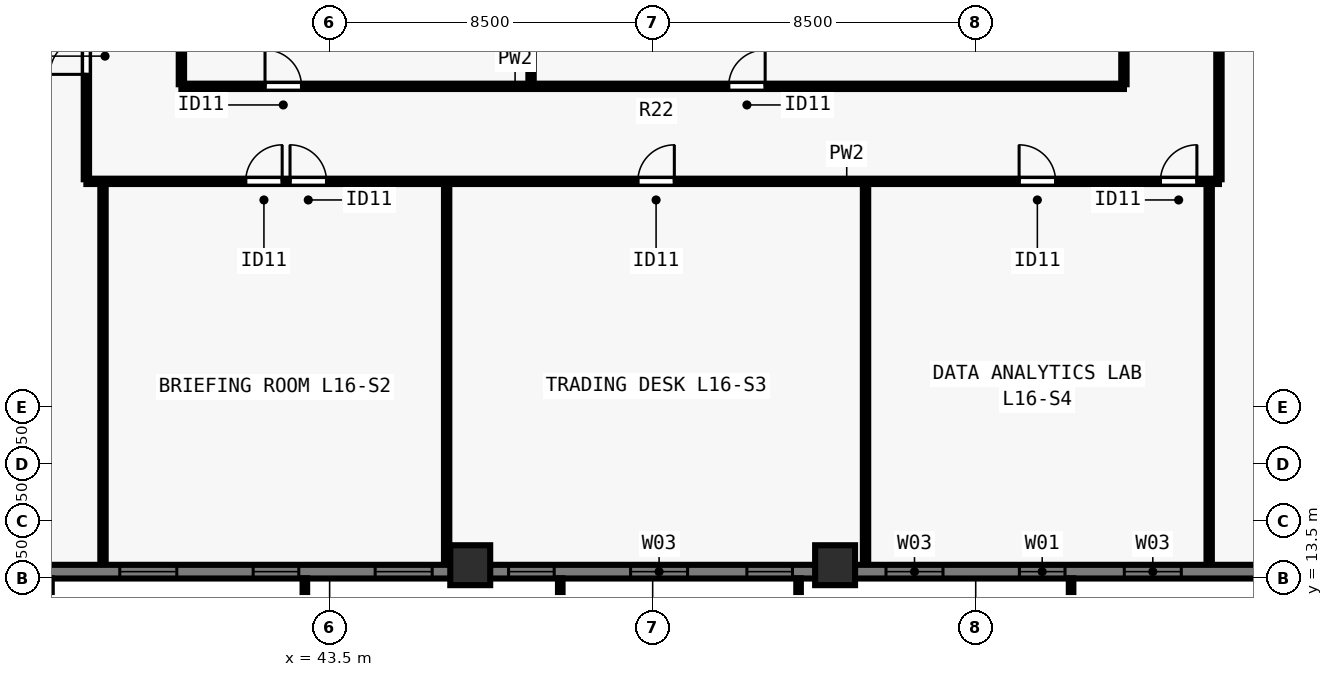
"""IFC4 building model, lengths in metres.
Left out: names, types, materials, properties, quantities, classifications, styles, units other than length and angle.
Written with IfcOpenShell. Run it as: python <this file> out.ifc"""

import sys

from ifc_helpers import new_model, si_unit, direction, frame, frame_2d, origin, origin_2d, place, context, subcontext, project, spatial, rectangle, extrude, element, fill, save


model = new_model("IFC4")
c1 = context("Model", 3, precision=1e-05, world=origin(), true_north=direction((0.0, 1.0)))
c2 = subcontext(c1, "Body", "Model", "MODEL_VIEW")
j1 = project(units=[si_unit("LENGTHUNIT", "METRE"), si_unit("PLANEANGLEUNIT", "RADIAN")], contexts=[c1])
p1 = place(None, origin())
s1 = spatial("IfcSite", under=j1, at=p1, CompositionType="ELEMENT")
p2 = place(p1, origin())
s2 = spatial("IfcBuilding", under=s1, at=p2, CompositionType="ELEMENT")
p3 = place(p2, frame((0.0, 0.0, 62.0)))
s3 = spatial("IfcBuildingStorey", under=s2, at=p3, CompositionType="ELEMENT", Elevation=62.0)
for number, where, z_axis, x_axis in (
    (1, (47.2, 13.85, 0.0), (0.0, 0.0, 1.0), (1.0, 0.0, 0.0)),
    (2, (56.8, 13.85, 0.0), (0.0, 0.0, 1.0), (1.0, 0.0, 0.0)),
):
    element("IfcColumn", number, at=place(p3, frame(where, z_axis=z_axis, x_axis=x_axis)), inside=s3, PredefinedType="COLUMN", context=c2, shape_type="SweptSolid", body=[
        extrude(rectangle(XDim=1.05, YDim=1.05, at=origin_2d()), origin(), (0.0, 0.0, 1.0), 3.5),
    ])
p4 = place(p3, frame((74.5, 13.68, 0.0), z_axis=(0.0, 0.0, 1.0), x_axis=(-1.0, 0.0, 0.0)))
e3 = element("IfcWall", 3, at=p4, inside=s3, PredefinedType="SOLIDWALL", context=c2, shape_type="SweptSolid", body=[
    extrude(rectangle(XDim=44.662, YDim=0.36, at=frame_2d((22.331, 0.0))), origin(), (0.0, 0.0, 1.0), 3.28),
])
p5 = place(p4, frame((4.93, 0.0, 0.8)))
e4 = element("IfcOpeningElement", 4, at=p5, cuts=e3, PredefinedType="OPENING", context=c2, shape_type="SweptSolid", body=[
    extrude(rectangle(XDim=1.2, YDim=1.544, at=frame_2d((0.6, 0.772))), frame((0.0, 0.19, 0.0), z_axis=(0.0, -1.0, 0.0), x_axis=(1.0, 0.0, 0.0)), (0.0, 0.0, 1.0), 0.38),
])
p6 = place(p4, frame((8.59, 0.0, 0.8)))
e5 = element("IfcOpeningElement", 5, at=p6, cuts=e3, PredefinedType="OPENING", context=c2, shape_type="SweptSolid", body=[
    extrude(rectangle(XDim=1.5, YDim=1.544, at=frame_2d((0.75, 0.772))), frame((0.0, 0.19, 0.0), z_axis=(0.0, -1.0, 0.0), x_axis=(1.0, 0.0, 0.0)), (0.0, 0.0, 1.0), 0.38),
])
p7 = place(p4, frame((11.65, 0.0, 0.8)))
e6 = element("IfcOpeningElement", 6, at=p7, cuts=e3, PredefinedType="OPENING", context=c2, shape_type="SweptSolid", body=[
    extrude(rectangle(XDim=1.2, YDim=1.544, at=frame_2d((0.6, 0.772))), frame((0.0, 0.19, 0.0), z_axis=(0.0, -1.0, 0.0), x_axis=(1.0, 0.0, 0.0)), (0.0, 0.0, 1.0), 0.38),
])
p8 = place(p4, frame((14.861, 0.0, 0.8)))
e7 = element("IfcOpeningElement", 7, at=p8, cuts=e3, PredefinedType="OPENING", context=c2, shape_type="SweptSolid", body=[
    extrude(rectangle(XDim=1.5, YDim=1.544, at=frame_2d((0.75, 0.772))), frame((0.0, 0.19, 0.0), z_axis=(0.0, -1.0, 0.0), x_axis=(1.0, 0.0, 0.0)), (0.0, 0.0, 1.0), 0.38),
])
p9 = place(p4, frame((18.821, 0.0, 0.8)))
e8 = element("IfcOpeningElement", 8, at=p9, cuts=e3, PredefinedType="OPENING", context=c2, shape_type="SweptSolid", body=[
    extrude(rectangle(XDim=1.2, YDim=1.544, at=frame_2d((0.6, 0.772))), frame((0.0, 0.19, 0.0), z_axis=(0.0, -1.0, 0.0), x_axis=(1.0, 0.0, 0.0)), (0.0, 0.0, 1.0), 0.38),
])
p10 = place(p4, frame((21.581, 0.0, 0.8)))
e9 = element("IfcOpeningElement", 9, at=p10, cuts=e3, PredefinedType="OPENING", context=c2, shape_type="SweptSolid", body=[
    extrude(rectangle(XDim=1.5, YDim=1.544, at=frame_2d((0.75, 0.772))), frame((0.0, 0.19, 0.0), z_axis=(0.0, -1.0, 0.0), x_axis=(1.0, 0.0, 0.0)), (0.0, 0.0, 1.0), 0.38),
])
p11 = place(p4, frame((25.091, 0.0, 0.8)))
e10 = element("IfcOpeningElement", 10, at=p11, cuts=e3, PredefinedType="OPENING", context=c2, shape_type="SweptSolid", body=[
    extrude(rectangle(XDim=1.2, YDim=1.544, at=frame_2d((0.6, 0.772))), frame((0.0, 0.19, 0.0), z_axis=(0.0, -1.0, 0.0), x_axis=(1.0, 0.0, 0.0)), (0.0, 0.0, 1.0), 0.38),
])
p12 = place(p4, frame((28.302, 0.0, 0.8)))
e11 = element("IfcOpeningElement", 11, at=p12, cuts=e3, PredefinedType="OPENING", context=c2, shape_type="SweptSolid", body=[
    extrude(rectangle(XDim=1.5, YDim=1.544, at=frame_2d((0.75, 0.772))), frame((0.0, 0.19, 0.0), z_axis=(0.0, -1.0, 0.0), x_axis=(1.0, 0.0, 0.0)), (0.0, 0.0, 1.0), 0.38),
])
p13 = place(p4, frame((31.812, 0.0, 0.8)))
e12 = element("IfcOpeningElement", 12, at=p13, cuts=e3, PredefinedType="OPENING", context=c2, shape_type="SweptSolid", body=[
    extrude(rectangle(XDim=1.2, YDim=1.544, at=frame_2d((0.6, 0.772))), frame((0.0, 0.19, 0.0), z_axis=(0.0, -1.0, 0.0), x_axis=(1.0, 0.0, 0.0)), (0.0, 0.0, 1.0), 0.38),
])
p14 = place(p4, frame((35.022, 0.0, 0.8)))
e13 = element("IfcOpeningElement", 13, at=p14, cuts=e3, PredefinedType="OPENING", context=c2, shape_type="SweptSolid", body=[
    extrude(rectangle(XDim=1.5, YDim=1.544, at=frame_2d((0.75, 0.772))), frame((0.0, 0.19, 0.0), z_axis=(0.0, -1.0, 0.0), x_axis=(1.0, 0.0, 0.0)), (0.0, 0.0, 1.0), 0.38),
])
p15 = place(p4, frame((38.532, 0.0, 0.8)))
e14 = element("IfcOpeningElement", 14, at=p15, cuts=e3, PredefinedType="OPENING", context=c2, shape_type="SweptSolid", body=[
    extrude(rectangle(XDim=1.2, YDim=1.544, at=frame_2d((0.6, 0.772))), frame((0.0, 0.19, 0.0), z_axis=(0.0, -1.0, 0.0), x_axis=(1.0, 0.0, 0.0)), (0.0, 0.0, 1.0), 0.38),
])
p16 = place(p3, frame((37.1, 23.95, 0.0), z_axis=(0.0, 0.0, 1.0), x_axis=(1.0, 0.0, 0.0)))
e15 = element("IfcWall", 15, at=p16, inside=s3, PredefinedType="PARTITIONING", context=c2, shape_type="SweptSolid", body=[
    extrude(rectangle(XDim=29.8, YDim=0.14, at=frame_2d((14.9, 0.0))), origin(), (0.0, 0.0, 1.0), 3.28),
])
p17 = place(p16, frame((4.191, 0.0, 0.0)))
e16 = element("IfcOpeningElement", 16, at=p17, cuts=e15, PredefinedType="OPENING", context=c2, shape_type="SweptSolid", body=[
    extrude(rectangle(XDim=0.96, YDim=2.12, at=frame_2d((0.48, 1.06))), frame((0.0, 0.08, 0.0), z_axis=(0.0, -1.0, 0.0), x_axis=(1.0, 0.0, 0.0)), (0.0, 0.0, 1.0), 0.16),
])
p18 = place(p16, frame((5.358, 0.0, 0.0)))
e17 = element("IfcOpeningElement", 17, at=p18, cuts=e15, PredefinedType="OPENING", context=c2, shape_type="SweptSolid", body=[
    extrude(rectangle(XDim=0.96, YDim=2.12, at=frame_2d((0.48, 1.06))), frame((0.0, 0.08, 0.0), z_axis=(0.0, -1.0, 0.0), x_axis=(1.0, 0.0, 0.0)), (0.0, 0.0, 1.0), 0.16),
])
p19 = place(p16, frame((14.51, 0.0, 0.0)))
e18 = element("IfcOpeningElement", 18, at=p19, cuts=e15, PredefinedType="OPENING", context=c2, shape_type="SweptSolid", body=[
    extrude(rectangle(XDim=0.96, YDim=2.12, at=frame_2d((0.48, 1.06))), frame((0.0, 0.08, 0.0), z_axis=(0.0, -1.0, 0.0), x_axis=(1.0, 0.0, 0.0)), (0.0, 0.0, 1.0), 0.16),
])
p20 = place(p16, frame((24.542, 0.0, 0.0)))
e19 = element("IfcOpeningElement", 19, at=p20, cuts=e15, PredefinedType="OPENING", context=c2, shape_type="SweptSolid", body=[
    extrude(rectangle(XDim=0.96, YDim=2.12, at=frame_2d((0.48, 1.06))), frame((0.0, 0.08, 0.0), z_axis=(0.0, -1.0, 0.0), x_axis=(1.0, 0.0, 0.0)), (0.0, 0.0, 1.0), 0.16),
])
p21 = place(p16, frame((28.26, 0.0, 0.0)))
e20 = element("IfcOpeningElement", 20, at=p21, cuts=e15, PredefinedType="OPENING", context=c2, shape_type="SweptSolid", body=[
    extrude(rectangle(XDim=0.96, YDim=2.12, at=frame_2d((0.48, 1.06))), frame((0.0, 0.08, 0.0), z_axis=(0.0, -1.0, 0.0), x_axis=(1.0, 0.0, 0.0)), (0.0, 0.0, 1.0), 0.16),
])
p22 = place(p3, frame((37.1, 24.005, 0.0), z_axis=(0.0, 0.0, 1.0), x_axis=(0.0, 1.0, 0.0)))
e21 = element("IfcWall", 21, at=p22, inside=s3, PredefinedType="PARTITIONING", context=c2, shape_type="SweptSolid", body=[
    extrude(rectangle(XDim=29.99, YDim=0.14, at=frame_2d((14.995, 0.0))), origin(), (0.0, 0.0, 1.0), 3.28),
])
p23 = place(p22, frame((2.76, 0.0, 0.0)))
e22 = element("IfcOpeningElement", 22, at=p23, cuts=e21, PredefinedType="OPENING", context=c2, shape_type="SweptSolid", body=[
    extrude(rectangle(XDim=0.96, YDim=2.12, at=frame_2d((0.48, 1.06))), frame((0.0, 0.08, 0.0), z_axis=(0.0, -1.0, 0.0), x_axis=(1.0, 0.0, 0.0)), (0.0, 0.0, 1.0), 0.16),
])
p24 = place(p22, frame((8.598, 0.0, 0.0)))
e23 = element("IfcOpeningElement", 23, at=p24, cuts=e21, PredefinedType="OPENING", context=c2, shape_type="SweptSolid", body=[
    extrude(rectangle(XDim=0.96, YDim=2.12, at=frame_2d((0.48, 1.06))), frame((0.0, 0.08, 0.0), z_axis=(0.0, -1.0, 0.0), x_axis=(1.0, 0.0, 0.0)), (0.0, 0.0, 1.0), 0.16),
])
p25 = place(p22, frame((14.578, 0.0, 0.0)))
e24 = element("IfcOpeningElement", 24, at=p25, cuts=e21, PredefinedType="OPENING", context=c2, shape_type="SweptSolid", body=[
    extrude(rectangle(XDim=0.96, YDim=2.12, at=frame_2d((0.48, 1.06))), frame((0.0, 0.08, 0.0), z_axis=(0.0, -1.0, 0.0), x_axis=(1.0, 0.0, 0.0)), (0.0, 0.0, 1.0), 0.16),
])
p26 = place(p22, frame((20.558, 0.0, 0.0)))
e25 = element("IfcOpeningElement", 25, at=p26, cuts=e21, PredefinedType="OPENING", context=c2, shape_type="SweptSolid", body=[
    extrude(rectangle(XDim=0.96, YDim=2.12, at=frame_2d((0.48, 1.06))), frame((0.0, 0.08, 0.0), z_axis=(0.0, -1.0, 0.0), x_axis=(1.0, 0.0, 0.0)), (0.0, 0.0, 1.0), 0.16),
])
p27 = place(p22, frame((26.333, 0.0, 0.0)))
e26 = element("IfcOpeningElement", 26, at=p27, cuts=e21, PredefinedType="OPENING", context=c2, shape_type="SweptSolid", body=[
    extrude(rectangle(XDim=0.96, YDim=2.12, at=frame_2d((0.48, 1.06))), frame((0.0, 0.08, 0.0), z_axis=(0.0, -1.0, 0.0), x_axis=(1.0, 0.0, 0.0)), (0.0, 0.0, 1.0), 0.16),
])
p28 = place(p3, frame((66.9, 24.005, 0.0), z_axis=(0.0, 0.0, 1.0), x_axis=(0.0, 1.0, 0.0)))
e27 = element("IfcWall", 27, at=p28, inside=s3, PredefinedType="PARTITIONING", context=c2, shape_type="SweptSolid", body=[
    extrude(rectangle(XDim=29.99, YDim=0.14, at=frame_2d((14.995, 0.0))), origin(), (0.0, 0.0, 1.0), 3.28),
])
p29 = place(p28, frame((4.344, 0.0, 0.0)))
e28 = element("IfcOpeningElement", 28, at=p29, cuts=e27, PredefinedType="OPENING", context=c2, shape_type="SweptSolid", body=[
    extrude(rectangle(XDim=0.96, YDim=2.12, at=frame_2d((0.48, 1.06))), frame((0.0, 0.08, 0.0), z_axis=(0.0, -1.0, 0.0), x_axis=(1.0, 0.0, 0.0)), (0.0, 0.0, 1.0), 0.16),
])
p30 = place(p28, frame((14.452, 0.0, 0.0)))
e29 = element("IfcOpeningElement", 29, at=p30, cuts=e27, PredefinedType="OPENING", context=c2, shape_type="SweptSolid", body=[
    extrude(rectangle(XDim=0.96, YDim=2.12, at=frame_2d((0.48, 1.06))), frame((0.0, 0.08, 0.0), z_axis=(0.0, -1.0, 0.0), x_axis=(1.0, 0.0, 0.0)), (0.0, 0.0, 1.0), 0.16),
])
p31 = place(p28, frame((24.623, 0.0, 0.0)))
e30 = element("IfcOpeningElement", 30, at=p31, cuts=e27, PredefinedType="OPENING", context=c2, shape_type="SweptSolid", body=[
    extrude(rectangle(XDim=0.96, YDim=2.12, at=frame_2d((0.48, 1.06))), frame((0.0, 0.08, 0.0), z_axis=(0.0, -1.0, 0.0), x_axis=(1.0, 0.0, 0.0)), (0.0, 0.0, 1.0), 0.16),
])
p32 = place(p3, frame((39.6, 26.45, 0.0), z_axis=(0.0, 0.0, 1.0), x_axis=(1.0, 0.0, 0.0)))
e31 = element("IfcWall", 31, at=p32, inside=s3, PredefinedType="PARTITIONING", context=c2, shape_type="SweptSolid", body=[
    extrude(rectangle(XDim=24.8, YDim=0.14, at=frame_2d((12.4, 0.0))), origin(), (0.0, 0.0, 1.0), 3.28),
])
p33 = place(p32, frame((2.2, 0.0, 0.0)))
e32 = element("IfcOpeningElement", 32, at=p33, cuts=e31, PredefinedType="OPENING", context=c2, shape_type="SweptSolid", body=[
    extrude(rectangle(XDim=0.96, YDim=2.12, at=frame_2d((0.48, 1.06))), frame((0.0, 0.08, 0.0), z_axis=(0.0, -1.0, 0.0), x_axis=(1.0, 0.0, 0.0)), (0.0, 0.0, 1.0), 0.16),
])
p34 = place(p32, frame((14.4, 0.0, 0.0)))
e33 = element("IfcOpeningElement", 33, at=p34, cuts=e31, PredefinedType="OPENING", context=c2, shape_type="SweptSolid", body=[
    extrude(rectangle(XDim=0.96, YDim=2.12, at=frame_2d((0.48, 1.06))), frame((0.0, 0.08, 0.0), z_axis=(0.0, -1.0, 0.0), x_axis=(1.0, 0.0, 0.0)), (0.0, 0.0, 1.0), 0.16),
])
p35 = place(p3, frame((39.6, 26.505, 0.0), z_axis=(0.0, 0.0, 1.0), x_axis=(0.0, 1.0, 0.0)))
e34 = element("IfcWall", 34, at=p35, inside=s3, PredefinedType="PARTITIONING", context=c2, shape_type="SweptSolid", body=[
    extrude(rectangle(XDim=12.245, YDim=0.14, at=frame_2d((6.123, 0.0))), origin(), (0.0, 0.0, 1.0), 3.28),
])
p36 = place(p35, frame((1.045, 0.0, 0.0)))
e35 = element("IfcOpeningElement", 35, at=p36, cuts=e34, PredefinedType="OPENING", context=c2, shape_type="SweptSolid", body=[
    extrude(rectangle(XDim=0.88, YDim=2.1, at=frame_2d((0.44, 1.05))), frame((0.0, 0.08, 0.0), z_axis=(0.0, -1.0, 0.0), x_axis=(1.0, 0.0, 0.0)), (0.0, 0.0, 1.0), 0.16),
])
p37 = place(p35, frame((9.295, 0.0, 0.0)))
e36 = element("IfcOpeningElement", 36, at=p37, cuts=e34, PredefinedType="OPENING", context=c2, shape_type="SweptSolid", body=[
    extrude(rectangle(XDim=0.88, YDim=2.1, at=frame_2d((0.44, 1.05))), frame((0.0, 0.08, 0.0), z_axis=(0.0, -1.0, 0.0), x_axis=(1.0, 0.0, 0.0)), (0.0, 0.0, 1.0), 0.16),
])
p38 = place(p3, frame((64.4, 26.505, 0.0), z_axis=(0.0, 0.0, 1.0), x_axis=(0.0, 1.0, 0.0)))
e37 = element("IfcWall", 37, at=p38, inside=s3, PredefinedType="PARTITIONING", context=c2, shape_type="SweptSolid", body=[
    extrude(rectangle(XDim=12.245, YDim=0.14, at=frame_2d((6.123, 0.0))), origin(), (0.0, 0.0, 1.0), 3.28),
])
p39 = place(p38, frame((2.445, 0.0, 0.0)))
e38 = element("IfcOpeningElement", 38, at=p39, cuts=e37, PredefinedType="OPENING", context=c2, shape_type="SweptSolid", body=[
    extrude(rectangle(XDim=0.88, YDim=2.1, at=frame_2d((0.44, 1.05))), frame((0.0, 0.08, 0.0), z_axis=(0.0, -1.0, 0.0), x_axis=(1.0, 0.0, 0.0)), (0.0, 0.0, 1.0), 0.16),
])
p40 = place(p3, frame((48.8, 26.505, 0.0), z_axis=(0.0, 0.0, 1.0), x_axis=(0.0, 1.0, 0.0)))
e39 = element("IfcWall", 39, at=p40, inside=s3, PredefinedType="PARTITIONING", context=c2, shape_type="SweptSolid", body=[
    extrude(rectangle(XDim=3.735, YDim=0.14, at=frame_2d((1.868, 0.0))), origin(), (0.0, 0.0, 1.0), 3.28),
])
p41 = place(p3, frame((37.537, 13.92, 0.0), z_axis=(0.0, 0.0, 1.0), x_axis=(0.0, 1.0, 0.0)))
e40 = element("IfcWall", 40, at=p41, inside=s3, PredefinedType="PARTITIONING", context=c2, shape_type="SweptSolid", body=[
    extrude(rectangle(XDim=9.93, YDim=0.14, at=frame_2d((4.965, 0.0))), origin(), (0.0, 0.0, 1.0), 2.439),
])
for number, where, z_axis, x_axis in (
    (41, (46.579, 13.92, 0.0), (0.0, 0.0, 1.0), (0.0, 1.0, 0.0)),
    (42, (57.601, 13.92, 0.0), (0.0, 0.0, 1.0), (0.0, 1.0, 0.0)),
):
    element("IfcWall", number, at=place(p3, frame(where, z_axis=z_axis, x_axis=x_axis)), inside=s3, PredefinedType="PARTITIONING", context=c2, shape_type="SweptSolid", body=[
        extrude(rectangle(XDim=9.93, YDim=0.14, at=frame_2d((4.965, 0.0))), origin(), (0.0, 0.0, 1.0), 3.28),
    ])
p42 = place(p3, frame((66.643, 13.92, 0.0), z_axis=(0.0, 0.0, 1.0), x_axis=(0.0, 1.0, 0.0)))
e43 = element("IfcWall", 43, at=p42, inside=s3, PredefinedType="PARTITIONING", context=c2, shape_type="SweptSolid", body=[
    extrude(rectangle(XDim=9.93, YDim=0.14, at=frame_2d((4.965, 0.0))), origin(), (0.0, 0.0, 1.0), 2.439),
])
p43 = place(p6, origin())
e44 = element("IfcWindow", 44, at=p43, inside=s3, PartitioningType="SINGLE_PANEL", PredefinedType="WINDOW", context=c2, shape_type="SweptSolid", body=[
    extrude(rectangle(XDim=1.5, YDim=1.544, at=frame_2d((0.75, 0.772))), frame((0.0, -0.05, 0.0), z_axis=(0.0, -1.0, 0.0), x_axis=(1.0, 0.0, 0.0)), (0.0, 0.0, 1.0), 0.06),
])
fill(e5, e44)
p44 = place(p7, origin())
e45 = element("IfcWindow", 45, at=p44, inside=s3, PartitioningType="SINGLE_PANEL", PredefinedType="WINDOW", context=c2, shape_type="SweptSolid", body=[
    extrude(rectangle(XDim=1.2, YDim=1.544, at=frame_2d((0.6, 0.772))), frame((0.0, -0.05, 0.0), z_axis=(0.0, -1.0, 0.0), x_axis=(1.0, 0.0, 0.0)), (0.0, 0.0, 1.0), 0.06),
])
fill(e6, e45)
p45 = place(p8, origin())
e46 = element("IfcWindow", 46, at=p45, inside=s3, PartitioningType="SINGLE_PANEL", PredefinedType="WINDOW", context=c2, shape_type="SweptSolid", body=[
    extrude(rectangle(XDim=1.5, YDim=1.544, at=frame_2d((0.75, 0.772))), frame((0.0, -0.05, 0.0), z_axis=(0.0, -1.0, 0.0), x_axis=(1.0, 0.0, 0.0)), (0.0, 0.0, 1.0), 0.06),
])
fill(e7, e46)
p46 = place(p9, origin())
e47 = element("IfcWindow", 47, at=p46, inside=s3, PartitioningType="SINGLE_PANEL", PredefinedType="WINDOW", context=c2, shape_type="SweptSolid", body=[
    extrude(rectangle(XDim=1.2, YDim=1.544, at=frame_2d((0.6, 0.772))), frame((0.0, -0.05, 0.0), z_axis=(0.0, -1.0, 0.0), x_axis=(1.0, 0.0, 0.0)), (0.0, 0.0, 1.0), 0.06),
])
fill(e8, e47)
p47 = place(p10, origin())
e48 = element("IfcWindow", 48, at=p47, inside=s3, PartitioningType="SINGLE_PANEL", PredefinedType="WINDOW", context=c2, shape_type="SweptSolid", body=[
    extrude(rectangle(XDim=1.5, YDim=1.544, at=frame_2d((0.75, 0.772))), frame((0.0, -0.05, 0.0), z_axis=(0.0, -1.0, 0.0), x_axis=(1.0, 0.0, 0.0)), (0.0, 0.0, 1.0), 0.06),
])
fill(e9, e48)
p48 = place(p11, origin())
e49 = element("IfcWindow", 49, at=p48, inside=s3, PartitioningType="SINGLE_PANEL", PredefinedType="WINDOW", context=c2, shape_type="SweptSolid", body=[
    extrude(rectangle(XDim=1.2, YDim=1.544, at=frame_2d((0.6, 0.772))), frame((0.0, -0.05, 0.0), z_axis=(0.0, -1.0, 0.0), x_axis=(1.0, 0.0, 0.0)), (0.0, 0.0, 1.0), 0.06),
])
fill(e10, e49)
p49 = place(p12, origin())
e50 = element("IfcWindow", 50, at=p49, inside=s3, PartitioningType="SINGLE_PANEL", PredefinedType="WINDOW", context=c2, shape_type="SweptSolid", body=[
    extrude(rectangle(XDim=1.5, YDim=1.544, at=frame_2d((0.75, 0.772))), frame((0.0, -0.05, 0.0), z_axis=(0.0, -1.0, 0.0), x_axis=(1.0, 0.0, 0.0)), (0.0, 0.0, 1.0), 0.06),
])
fill(e11, e50)
p50 = place(p13, origin())
e51 = element("IfcWindow", 51, at=p50, inside=s3, PartitioningType="SINGLE_PANEL", PredefinedType="WINDOW", context=c2, shape_type="SweptSolid", body=[
    extrude(rectangle(XDim=1.2, YDim=1.544, at=frame_2d((0.6, 0.772))), frame((0.0, -0.05, 0.0), z_axis=(0.0, -1.0, 0.0), x_axis=(1.0, 0.0, 0.0)), (0.0, 0.0, 1.0), 0.06),
])
fill(e12, e51)
p51 = place(p14, origin())
e52 = element("IfcWindow", 52, at=p51, inside=s3, PartitioningType="SINGLE_PANEL", PredefinedType="WINDOW", context=c2, shape_type="SweptSolid", body=[
    extrude(rectangle(XDim=1.5, YDim=1.544, at=frame_2d((0.75, 0.772))), frame((0.0, -0.05, 0.0), z_axis=(0.0, -1.0, 0.0), x_axis=(1.0, 0.0, 0.0)), (0.0, 0.0, 1.0), 0.06),
])
fill(e13, e52)
p52 = place(p33, origin())
e53 = element("IfcDoor", 53, at=p52, inside=s3, OperationType="SINGLE_SWING_LEFT", PredefinedType="DOOR", context=c2, shape_type="SweptSolid", body=[
    extrude(rectangle(XDim=0.96, YDim=2.12, at=frame_2d((0.48, 1.06))), frame((0.0, 0.025, 0.0), z_axis=(0.0, -1.0, 0.0), x_axis=(1.0, 0.0, 0.0)), (0.0, 0.0, 1.0), 0.05),
])
fill(e32, e53)
p53 = place(p34, origin())
e54 = element("IfcDoor", 54, at=p53, inside=s3, OperationType="SINGLE_SWING_RIGHT", PredefinedType="DOOR", context=c2, shape_type="SweptSolid", body=[
    extrude(rectangle(XDim=0.96, YDim=2.12, at=frame_2d((0.48, 1.06))), frame((0.0, 0.025, 0.0), z_axis=(0.0, -1.0, 0.0), x_axis=(1.0, 0.0, 0.0)), (0.0, 0.0, 1.0), 0.05),
])
fill(e33, e54)
p54 = place(p17, origin())
e55 = element("IfcDoor", 55, at=p54, inside=s3, OperationType="SINGLE_SWING_RIGHT", PredefinedType="DOOR", context=c2, shape_type="SweptSolid", body=[
    extrude(rectangle(XDim=0.96, YDim=2.12, at=frame_2d((0.48, 1.06))), frame((0.0, 0.025, 0.0), z_axis=(0.0, -1.0, 0.0), x_axis=(1.0, 0.0, 0.0)), (0.0, 0.0, 1.0), 0.05),
])
fill(e16, e55)
p55 = place(p18, origin())
e56 = element("IfcDoor", 56, at=p55, inside=s3, OperationType="SINGLE_SWING_LEFT", PredefinedType="DOOR", context=c2, shape_type="SweptSolid", body=[
    extrude(rectangle(XDim=0.96, YDim=2.12, at=frame_2d((0.48, 1.06))), frame((0.0, 0.025, 0.0), z_axis=(0.0, -1.0, 0.0), x_axis=(1.0, 0.0, 0.0)), (0.0, 0.0, 1.0), 0.05),
])
fill(e17, e56)
p56 = place(p19, origin())
e57 = element("IfcDoor", 57, at=p56, inside=s3, OperationType="SINGLE_SWING_RIGHT", PredefinedType="DOOR", context=c2, shape_type="SweptSolid", body=[
    extrude(rectangle(XDim=0.96, YDim=2.12, at=frame_2d((0.48, 1.06))), frame((0.0, 0.025, 0.0), z_axis=(0.0, -1.0, 0.0), x_axis=(1.0, 0.0, 0.0)), (0.0, 0.0, 1.0), 0.05),
])
fill(e18, e57)
p57 = place(p20, origin())
e58 = element("IfcDoor", 58, at=p57, inside=s3, OperationType="SINGLE_SWING_LEFT", PredefinedType="DOOR", context=c2, shape_type="SweptSolid", body=[
    extrude(rectangle(XDim=0.96, YDim=2.12, at=frame_2d((0.48, 1.06))), frame((0.0, 0.025, 0.0), z_axis=(0.0, -1.0, 0.0), x_axis=(1.0, 0.0, 0.0)), (0.0, 0.0, 1.0), 0.05),
])
fill(e19, e58)
p58 = place(p21, origin())
e59 = element("IfcDoor", 59, at=p58, inside=s3, OperationType="SINGLE_SWING_RIGHT", PredefinedType="DOOR", context=c2, shape_type="SweptSolid", body=[
    extrude(rectangle(XDim=0.96, YDim=2.12, at=frame_2d((0.48, 1.06))), frame((0.0, 0.025, 0.0), z_axis=(0.0, -1.0, 0.0), x_axis=(1.0, 0.0, 0.0)), (0.0, 0.0, 1.0), 0.05),
])
fill(e20, e59)
p59 = place(p23, origin())
e60 = element("IfcDoor", 60, at=p59, inside=s3, OperationType="SINGLE_SWING_LEFT", PredefinedType="DOOR", context=c2, shape_type="SweptSolid", body=[
    extrude(rectangle(XDim=0.96, YDim=2.12, at=frame_2d((0.48, 1.06))), frame((0.0, 0.025, 0.0), z_axis=(0.0, -1.0, 0.0), x_axis=(1.0, 0.0, 0.0)), (0.0, 0.0, 1.0), 0.05),
])
fill(e22, e60)
save(model, sys.argv[1])
